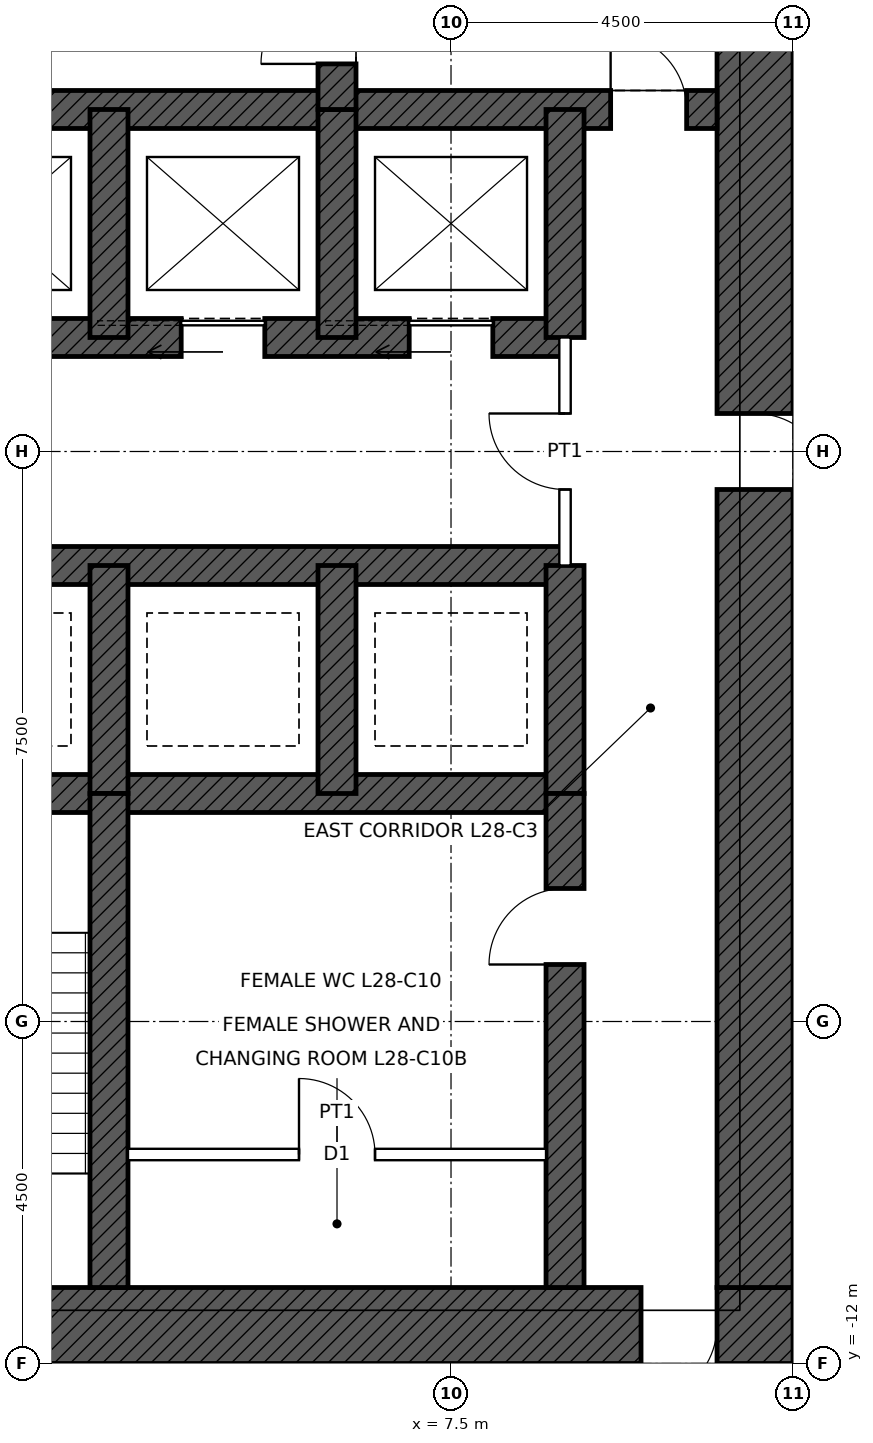
"""IFC4 building model, lengths in metres.
Left out: names, types, materials, properties, quantities, classifications, styles, units other than length and angle.
Written with IfcOpenShell. Run it as: python <this file> out.ifc"""

import sys

from ifc_helpers import new_model, si_unit, direction, frame, frame_2d, origin, place, context, subcontext, project, spatial, rectangle, extrude, element, fill, save


model = new_model("IFC4")
c1 = context("Model", 3, precision=1e-05, world=origin(), true_north=direction((0.0, 1.0)))
c2 = subcontext(c1, "Body", "Model", "MODEL_VIEW")
j1 = project(units=[si_unit("LENGTHUNIT", "METRE"), si_unit("PLANEANGLEUNIT", "RADIAN")], contexts=[c1])
p1 = place(None, origin())
s1 = spatial("IfcSite", under=j1, at=p1, CompositionType="ELEMENT")
p2 = place(p1, origin())
s2 = spatial("IfcBuilding", under=s1, at=p2, CompositionType="ELEMENT")
p3 = place(p2, frame((0.0, 0.0, 140.4)))
s3 = spatial("IfcBuildingStorey", under=s2, at=p3, CompositionType="ELEMENT", Elevation=140.4)
p4 = place(p3, frame((12.0, -11.5, 0.0), z_axis=(0.0, 0.0, 1.0), x_axis=(-1.0, 0.0, 0.0)))
e1 = element("IfcWall", 1, at=p4, inside=s3, PredefinedType="SHEAR", context=c2, shape_type="SweptSolid", body=[
    extrude(rectangle(XDim=24.0, YDim=1.0, at=frame_2d((12.0, 0.0))), origin(), (0.0, 0.0, 1.0), 4.5),
])
p5 = place(p4, frame((11.5, 0.0, 0.0)))
e2 = element("IfcOpeningElement", 2, at=p5, cuts=e1, PredefinedType="OPENING", context=c2, shape_type="SweptSolid", body=[
    extrude(rectangle(XDim=1.0, YDim=2.1, at=frame_2d((0.5, 1.05))), frame((0.0, 0.51, 0.0), z_axis=(0.0, -1.0, 0.0), x_axis=(1.0, 0.0, 0.0)), (0.0, 0.0, 1.0), 1.02),
])
p6 = place(p4, frame((1.0, 0.0, 0.0)))
e3 = element("IfcOpeningElement", 3, at=p6, cuts=e1, PredefinedType="OPENING", context=c2, shape_type="SweptSolid", body=[
    extrude(rectangle(XDim=1.0, YDim=2.4, at=frame_2d((0.5, 1.2))), frame((0.0, 0.51, 0.0), z_axis=(0.0, -1.0, 0.0), x_axis=(1.0, 0.0, 0.0)), (0.0, 0.0, 1.0), 1.02),
])
p7 = place(p3, frame((11.5, 11.0, 0.0), z_axis=(0.0, 0.0, 1.0), x_axis=(0.0, -1.0, 0.0)))
e4 = element("IfcWall", 4, at=p7, inside=s3, PredefinedType="SHEAR", context=c2, shape_type="SweptSolid", body=[
    extrude(rectangle(XDim=22.0, YDim=1.0, at=frame_2d((11.0, 0.0))), origin(), (0.0, 0.0, 1.0), 4.5),
])
p8 = place(p7, frame((10.5, 0.0, 0.0)))
e5 = element("IfcOpeningElement", 5, at=p8, cuts=e4, PredefinedType="OPENING", context=c2, shape_type="SweptSolid", body=[
    extrude(rectangle(XDim=1.0, YDim=2.4, at=frame_2d((0.5, 1.2))), frame((0.0, 0.51, 0.0), z_axis=(0.0, -1.0, 0.0), x_axis=(1.0, 0.0, 0.0)), (0.0, 0.0, 1.0), 1.02),
])
p9 = place(p3, frame((-11.0, 4.5, 0.0), z_axis=(0.0, 0.0, 1.0), x_axis=(1.0, 0.0, 0.0)))
e6 = element("IfcWall", 6, at=p9, inside=s3, PredefinedType="SHEAR", context=c2, shape_type="SweptSolid", body=[
    extrude(rectangle(XDim=22.0, YDim=0.5, at=frame_2d((11.0, 0.0))), origin(), (0.0, 0.0, 1.0), 4.5),
])
p10 = place(p9, frame((0.4, 0.0, 0.0)))
e7 = element("IfcOpeningElement", 7, at=p10, cuts=e6, PredefinedType="OPENING", context=c2, shape_type="SweptSolid", body=[
    extrude(rectangle(XDim=1.0, YDim=2.1, at=frame_2d((0.5, 1.05))), frame((0.0, 0.26, 0.0), z_axis=(0.0, -1.0, 0.0), x_axis=(1.0, 0.0, 0.0)), (0.0, 0.0, 1.0), 0.52),
])
p11 = place(p9, frame((20.6, 0.0, 0.0)))
e8 = element("IfcOpeningElement", 8, at=p11, cuts=e6, PredefinedType="OPENING", context=c2, shape_type="SweptSolid", body=[
    extrude(rectangle(XDim=1.0, YDim=2.1, at=frame_2d((0.5, 1.05))), frame((0.0, 0.26, 0.0), z_axis=(0.0, -1.0, 0.0), x_axis=(1.0, 0.0, 0.0)), (0.0, 0.0, 1.0), 0.52),
])
p12 = place(p3, frame((-9.0, 1.5, 0.0), z_axis=(0.0, 0.0, 1.0), x_axis=(1.0, 0.0, 0.0)))
e9 = element("IfcWall", 9, at=p12, inside=s3, PredefinedType="SHEAR", context=c2, shape_type="SweptSolid", body=[
    extrude(rectangle(XDim=18.0, YDim=0.5, at=frame_2d((9.0, 0.0))), origin(), (0.0, 0.0, 1.0), 4.5),
])
p13 = place(p12, frame((9.95, 0.0, 0.0)))
e10 = element("IfcOpeningElement", 10, at=p13, cuts=e9, PredefinedType="OPENING", context=c2, shape_type="SweptSolid", body=[
    extrude(rectangle(XDim=1.1, YDim=2.1, at=frame_2d((0.55, 1.05))), frame((0.0, 0.26, 0.0), z_axis=(0.0, -1.0, 0.0), x_axis=(1.0, 0.0, 0.0)), (0.0, 0.0, 1.0), 0.52),
])
p14 = place(p12, frame((12.95, 0.0, 0.0)))
e11 = element("IfcOpeningElement", 11, at=p14, cuts=e9, PredefinedType="OPENING", context=c2, shape_type="SweptSolid", body=[
    extrude(rectangle(XDim=1.1, YDim=2.1, at=frame_2d((0.55, 1.05))), frame((0.0, 0.26, 0.0), z_axis=(0.0, -1.0, 0.0), x_axis=(1.0, 0.0, 0.0)), (0.0, 0.0, 1.0), 0.52),
])
p15 = place(p12, frame((15.95, 0.0, 0.0)))
e12 = element("IfcOpeningElement", 12, at=p15, cuts=e9, PredefinedType="OPENING", context=c2, shape_type="SweptSolid", body=[
    extrude(rectangle(XDim=1.1, YDim=2.1, at=frame_2d((0.55, 1.05))), frame((0.0, 0.26, 0.0), z_axis=(0.0, -1.0, 0.0), x_axis=(1.0, 0.0, 0.0)), (0.0, 0.0, 1.0), 0.52),
])
p16 = place(p12, frame((0.95, 0.0, 0.0)))
e13 = element("IfcOpeningElement", 13, at=p16, cuts=e9, PredefinedType="OPENING", context=c2, shape_type="SweptSolid", body=[
    extrude(rectangle(XDim=1.1, YDim=2.1, at=frame_2d((0.55, 1.05))), frame((0.0, 0.26, 0.0), z_axis=(0.0, -1.0, 0.0), x_axis=(1.0, 0.0, 0.0)), (0.0, 0.0, 1.0), 0.52),
])
p17 = place(p12, frame((3.95, 0.0, 0.0)))
e14 = element("IfcOpeningElement", 14, at=p17, cuts=e9, PredefinedType="OPENING", context=c2, shape_type="SweptSolid", body=[
    extrude(rectangle(XDim=1.1, YDim=2.1, at=frame_2d((0.55, 1.05))), frame((0.0, 0.26, 0.0), z_axis=(0.0, -1.0, 0.0), x_axis=(1.0, 0.0, 0.0)), (0.0, 0.0, 1.0), 0.52),
])
p18 = place(p12, frame((6.95, 0.0, 0.0)))
e15 = element("IfcOpeningElement", 15, at=p18, cuts=e9, PredefinedType="OPENING", context=c2, shape_type="SweptSolid", body=[
    extrude(rectangle(XDim=1.1, YDim=2.1, at=frame_2d((0.55, 1.05))), frame((0.0, 0.26, 0.0), z_axis=(0.0, -1.0, 0.0), x_axis=(1.0, 0.0, 0.0)), (0.0, 0.0, 1.0), 0.52),
])
for number, where, z_axis, x_axis in (
    (16, (-9.0, -1.5, 0.0), (0.0, 0.0, 1.0), (1.0, 0.0, 0.0)),
    (17, (-9.0, -4.5, 0.0), (0.0, 0.0, 1.0), (1.0, 0.0, 0.0)),
):
    element("IfcWall", number, at=place(p3, frame(where, z_axis=z_axis, x_axis=x_axis)), inside=s3, PredefinedType="SHEAR", context=c2, shape_type="SweptSolid", body=[
        extrude(rectangle(XDim=18.0, YDim=0.5, at=frame_2d((9.0, 0.0))), origin(), (0.0, 0.0, 1.0), 4.5),
    ])
for number, where, z_axis, x_axis in (
    (18, (9.0, 1.5, 0.0), (0.0, 0.0, 1.0), (0.0, 1.0, 0.0)),
    (19, (9.0, -4.5, 0.0), (0.0, 0.0, 1.0), (0.0, 1.0, 0.0)),
    (20, (3.0, 1.5, 0.0), (0.0, 0.0, 1.0), (0.0, 1.0, 0.0)),
    (21, (6.0, 1.5, 0.0), (0.0, 0.0, 1.0), (0.0, 1.0, 0.0)),
    (22, (3.0, -4.5, 0.0), (0.0, 0.0, 1.0), (0.0, 1.0, 0.0)),
    (23, (6.0, -4.5, 0.0), (0.0, 0.0, 1.0), (0.0, 1.0, 0.0)),
):
    element("IfcWall", number, at=place(p3, frame(where, z_axis=z_axis, x_axis=x_axis)), inside=s3, PredefinedType="SHEAR", context=c2, shape_type="SweptSolid", body=[
        extrude(rectangle(XDim=3.0, YDim=0.5, at=frame_2d((1.5, 0.0))), origin(), (0.0, 0.0, 1.0), 4.5),
    ])
p19 = place(p3, frame((6.0, 4.5, 0.0), z_axis=(0.0, 0.0, 1.0), x_axis=(0.0, 1.0, 0.0)))
e24 = element("IfcWall", 24, at=p19, inside=s3, PredefinedType="SHEAR", context=c2, shape_type="SweptSolid", body=[
    extrude(rectangle(XDim=6.5, YDim=0.5, at=frame_2d((3.25, 0.0))), origin(), (0.0, 0.0, 1.0), 4.5),
])
p20 = place(p19, frame((0.6, 0.0, 0.0)))
e25 = element("IfcOpeningElement", 25, at=p20, cuts=e24, PredefinedType="OPENING", context=c2, shape_type="SweptSolid", body=[
    extrude(rectangle(XDim=1.0, YDim=2.1, at=frame_2d((0.5, 1.05))), frame((0.0, 0.26, 0.0), z_axis=(0.0, -1.0, 0.0), x_axis=(1.0, 0.0, 0.0)), (0.0, 0.0, 1.0), 0.52),
])
p21 = place(p3, frame((9.0, -11.0, 0.0), z_axis=(0.0, 0.0, 1.0), x_axis=(0.0, 1.0, 0.0)))
e26 = element("IfcWall", 26, at=p21, inside=s3, PredefinedType="SHEAR", context=c2, shape_type="SweptSolid", body=[
    extrude(rectangle(XDim=6.5, YDim=0.5, at=frame_2d((3.25, 0.0))), origin(), (0.0, 0.0, 1.0), 4.5),
])
p22 = place(p21, frame((4.25, 0.0, 0.0)))
e27 = element("IfcOpeningElement", 27, at=p22, cuts=e26, PredefinedType="OPENING", context=c2, shape_type="SweptSolid", body=[
    extrude(rectangle(XDim=1.0, YDim=2.1, at=frame_2d((0.5, 1.05))), frame((0.0, 0.26, 0.0), z_axis=(0.0, -1.0, 0.0), x_axis=(1.0, 0.0, 0.0)), (0.0, 0.0, 1.0), 0.52),
])
p23 = place(p3, frame((3.0, -11.0, 0.0), z_axis=(0.0, 0.0, 1.0), x_axis=(0.0, 1.0, 0.0)))
e28 = element("IfcWall", 28, at=p23, inside=s3, PredefinedType="SHEAR", context=c2, shape_type="SweptSolid", body=[
    extrude(rectangle(XDim=6.5, YDim=0.5, at=frame_2d((3.25, 0.0))), origin(), (0.0, 0.0, 1.0), 4.5),
])
p24 = place(p3, frame((3.25, -9.25, 0.0), z_axis=(0.0, 0.0, 1.0), x_axis=(1.0, 0.0, 0.0)))
e29 = element("IfcWall", 29, at=p24, inside=s3, PredefinedType="PARTITIONING", context=c2, shape_type="SweptSolid", body=[
    extrude(rectangle(XDim=5.5, YDim=0.15, at=frame_2d((2.75, 0.0))), origin(), (0.0, 0.0, 1.0), 4.25),
])
p25 = place(p24, frame((2.25, 0.0, 0.0)))
e30 = element("IfcOpeningElement", 30, at=p25, cuts=e29, PredefinedType="OPENING", context=c2, shape_type="SweptSolid", body=[
    extrude(rectangle(XDim=1.0, YDim=2.1, at=frame_2d((0.5, 1.05))), frame((0.0, 0.085, 0.0), z_axis=(0.0, -1.0, 0.0), x_axis=(1.0, 0.0, 0.0)), (0.0, 0.0, 1.0), 0.17),
])
p26 = place(p3, frame((9.0, -1.5, 0.0), z_axis=(0.0, 0.0, 1.0), x_axis=(0.0, 1.0, 0.0)))
e31 = element("IfcWall", 31, at=p26, inside=s3, PredefinedType="PARTITIONING", context=c2, shape_type="SweptSolid", body=[
    extrude(rectangle(XDim=3.0, YDim=0.15, at=frame_2d((1.5, 0.0))), origin(), (0.0, 0.0, 1.0), 4.25),
])
p27 = place(p26, frame((1.0, 0.0, 0.0)))
e32 = element("IfcOpeningElement", 32, at=p27, cuts=e31, PredefinedType="OPENING", context=c2, shape_type="SweptSolid", body=[
    extrude(rectangle(XDim=1.0, YDim=2.4, at=frame_2d((0.5, 1.2))), frame((0.0, 0.085, 0.0), z_axis=(0.0, -1.0, 0.0), x_axis=(1.0, 0.0, 0.0)), (0.0, 0.0, 1.0), 0.17),
])
p28 = place(p11, origin())
e33 = element("IfcDoor", 33, at=p28, inside=s3, OperationType="SINGLE_SWING_LEFT", PredefinedType="DOOR", context=c2, shape_type="SweptSolid", body=[
    extrude(rectangle(XDim=1.0, YDim=2.1, at=frame_2d((0.5, 1.05))), frame((0.0, 0.025, 0.0), z_axis=(0.0, -1.0, 0.0), x_axis=(1.0, 0.0, 0.0)), (0.0, 0.0, 1.0), 0.05),
])
fill(e8, e33)
p29 = place(p20, origin())
e34 = element("IfcDoor", 34, at=p29, inside=s3, OperationType="SINGLE_SWING_LEFT", PredefinedType="DOOR", context=c2, shape_type="SweptSolid", body=[
    extrude(rectangle(XDim=1.0, YDim=2.1, at=frame_2d((0.5, 1.05))), frame((0.0, 0.025, 0.0), z_axis=(0.0, -1.0, 0.0), x_axis=(1.0, 0.0, 0.0)), (0.0, 0.0, 1.0), 0.05),
])
fill(e25, e34)
p30 = place(p8, origin())
e35 = element("IfcDoor", 35, at=p30, inside=s3, OperationType="SINGLE_SWING_RIGHT", PredefinedType="DOOR", context=c2, shape_type="SweptSolid", body=[
    extrude(rectangle(XDim=1.0, YDim=2.4, at=frame_2d((0.5, 1.2))), frame((0.0, 0.485, 0.0), z_axis=(0.0, -1.0, 0.0), x_axis=(1.0, 0.0, 0.0)), (0.0, 0.0, 1.0), 0.05),
])
fill(e5, e35)
p31 = place(p6, origin())
e36 = element("IfcDoor", 36, at=p31, inside=s3, OperationType="SINGLE_SWING_RIGHT", PredefinedType="DOOR", context=c2, shape_type="SweptSolid", body=[
    extrude(rectangle(XDim=1.0, YDim=2.4, at=frame_2d((0.5, 1.2))), frame((0.0, 0.485, 0.0), z_axis=(0.0, -1.0, 0.0), x_axis=(1.0, 0.0, 0.0)), (0.0, 0.0, 1.0), 0.05),
])
fill(e3, e36)
p32 = place(p22, origin())
e37 = element("IfcDoor", 37, at=p32, inside=s3, OperationType="SINGLE_SWING_LEFT", PredefinedType="DOOR", context=c2, shape_type="SweptSolid", body=[
    extrude(rectangle(XDim=1.0, YDim=2.1, at=frame_2d((0.5, 1.05))), frame((0.0, 0.025, 0.0), z_axis=(0.0, -1.0, 0.0), x_axis=(1.0, 0.0, 0.0)), (0.0, 0.0, 1.0), 0.05),
])
fill(e27, e37)
p33 = place(p14, origin())
e38 = element("IfcDoor", 38, at=p33, inside=s3, OperationType="SLIDING_TO_LEFT", PredefinedType="DOOR", context=c2, shape_type="SweptSolid", body=[
    extrude(rectangle(XDim=1.1, YDim=2.1, at=frame_2d((0.55, 1.05))), frame((0.0, 0.025, 0.0), z_axis=(0.0, -1.0, 0.0), x_axis=(1.0, 0.0, 0.0)), (0.0, 0.0, 1.0), 0.05),
])
fill(e11, e38)
p34 = place(p15, origin())
e39 = element("IfcDoor", 39, at=p34, inside=s3, OperationType="SLIDING_TO_LEFT", PredefinedType="DOOR", context=c2, shape_type="SweptSolid", body=[
    extrude(rectangle(XDim=1.1, YDim=2.1, at=frame_2d((0.55, 1.05))), frame((0.0, 0.025, 0.0), z_axis=(0.0, -1.0, 0.0), x_axis=(1.0, 0.0, 0.0)), (0.0, 0.0, 1.0), 0.05),
])
fill(e12, e39)
p35 = place(p25, origin())
e40 = element("IfcDoor", 40, at=p35, inside=s3, OperationType="SINGLE_SWING_LEFT", PredefinedType="DOOR", context=c2, shape_type="SweptSolid", body=[
    extrude(rectangle(XDim=1.0, YDim=2.1, at=frame_2d((0.5, 1.05))), frame((0.0, 0.025, 0.0), z_axis=(0.0, -1.0, 0.0), x_axis=(1.0, 0.0, 0.0)), (0.0, 0.0, 1.0), 0.05),
])
fill(e30, e40)
p36 = place(p27, origin())
e41 = element("IfcDoor", 41, at=p36, inside=s3, OperationType="SINGLE_SWING_RIGHT", PredefinedType="DOOR", context=c2, shape_type="SweptSolid", body=[
    extrude(rectangle(XDim=1.0, YDim=2.4, at=frame_2d((0.5, 1.2))), frame((0.0, 0.025, 0.0), z_axis=(0.0, -1.0, 0.0), x_axis=(1.0, 0.0, 0.0)), (0.0, 0.0, 1.0), 0.05),
])
fill(e32, e41)
save(model, sys.argv[1])
